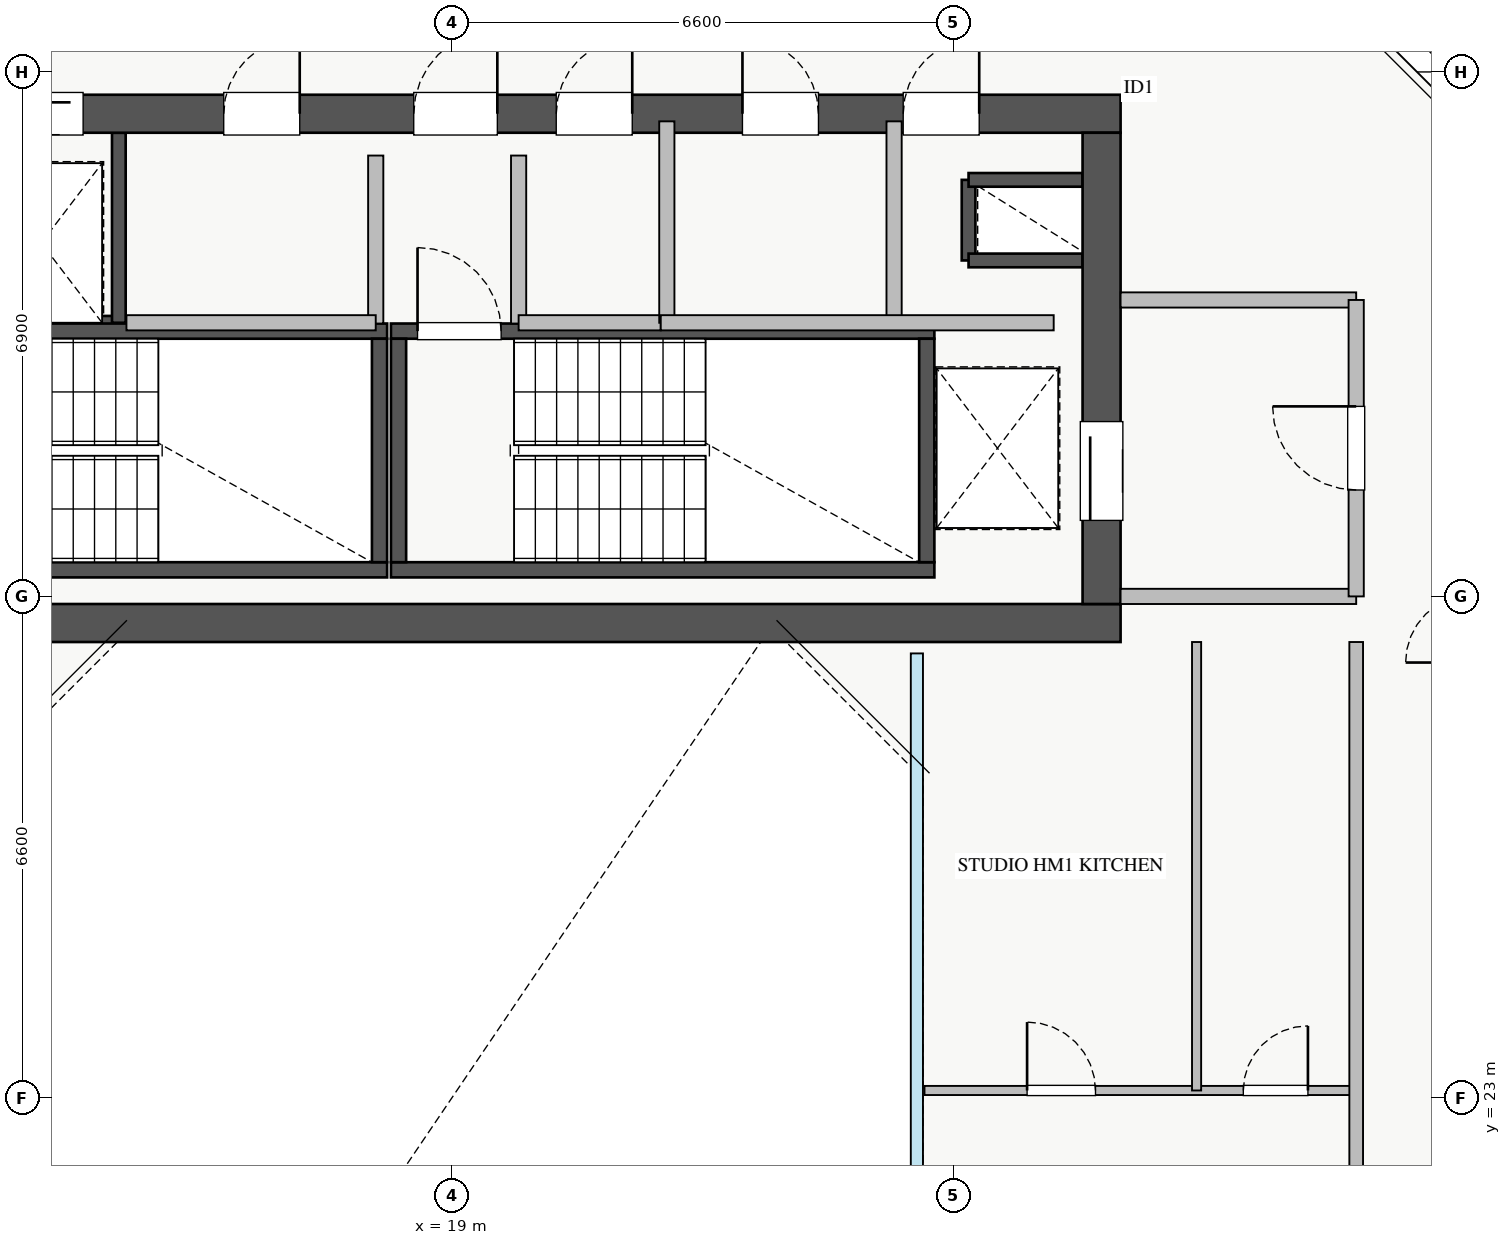
"""IFC4 building model, lengths in metres.
Left out: names, types, materials, properties, quantities, classifications, styles, units other than length and angle.
Written with IfcOpenShell. Run it as: python <this file> out.ifc"""

import sys

from ifc_helpers import new_model, si_unit, direction, frame, frame_2d, origin, place, context, subcontext, project, spatial, rectangle, extrude, source, transform, mapped, element, fill, save


model = new_model("IFC4")
c1 = context("Model", 3, precision=1e-05, world=origin(), true_north=direction((0.0, 1.0)))
c2 = subcontext(c1, "Body", "Model", "MODEL_VIEW")
j1 = project(units=[si_unit("LENGTHUNIT", "METRE"), si_unit("PLANEANGLEUNIT", "RADIAN")], contexts=[c1])
p1 = place(None, origin())
s1 = spatial("IfcSite", under=j1, at=p1, CompositionType="ELEMENT")
p2 = place(p1, origin())
s2 = spatial("IfcBuilding", under=s1, at=p2, CompositionType="ELEMENT")
p3 = place(p2, frame((0.0, 0.0, 197.0)))
s3 = spatial("IfcBuildingStorey", under=s2, at=p3, CompositionType="ELEMENT", Elevation=197.0)
p4 = place(p3, frame((12.68, 33.2, 0.0), z_axis=(0.0, 0.0, 1.0), x_axis=(1.0, 0.0, 0.0)))
e1 = element("IfcWall", 1, at=p4, inside=s3, PredefinedType="SHEAR", context=c2, shape_type="SweptSolid", body=[
    extrude(rectangle(XDim=1.94, YDim=0.18, at=frame_2d((0.97, 0.0))), origin(), (0.0, 0.0, 1.0), 3.07),
])
p5 = place(p3, frame((14.62, 33.2, 0.0), z_axis=(0.0, 0.0, 1.0), x_axis=(0.0, 1.0, 0.0)))
e2 = element("IfcWall", 2, at=p5, inside=s3, PredefinedType="SHEAR", context=c2, shape_type="SweptSolid", body=[
    extrude(rectangle(XDim=2.5, YDim=0.18, at=frame_2d((1.25, 0.0))), origin(), (0.0, 0.0, 1.0), 3.07),
])
p6 = place(p3, frame((25.8, 34.02, 0.0), z_axis=(0.0, 0.0, 1.0), x_axis=(0.0, 1.0, 0.0)))
e3 = element("IfcWall", 3, at=p6, inside=s3, PredefinedType="SHEAR", context=c2, shape_type="SweptSolid", body=[
    extrude(rectangle(XDim=1.06, YDim=0.18, at=frame_2d((0.53, 0.0))), origin(), (0.0, 0.0, 1.0), 3.07),
])
for number, where, z_axis, x_axis in (
    (4, (25.8, 35.08, 0.0), (0.0, 0.0, 1.0), (1.0, 0.0, 0.0)),
    (5, (25.8, 34.02, 0.0), (0.0, 0.0, 1.0), (1.0, 0.0, 0.0)),
):
    element("IfcWall", number, at=place(p3, frame(where, z_axis=z_axis, x_axis=x_axis)), inside=s3, PredefinedType="SHEAR", context=c2, shape_type="SweptSolid", body=[
        extrude(rectangle(XDim=1.5, YDim=0.18, at=frame_2d((0.75, 0.0))), origin(), (0.0, 0.0, 1.0), 3.07),
    ])
p7 = place(p3, frame((10.7, 29.95, 0.0), z_axis=(0.0, 0.0, 1.0), x_axis=(1.0, 0.0, 0.0)))
e6 = element("IfcWall", 6, at=p7, inside=s3, PredefinedType="SHEAR", context=c2, shape_type="SweptSolid", body=[
    extrude(rectangle(XDim=7.45, YDim=0.2, at=frame_2d((3.725, 0.0))), origin(), (0.0, 0.0, 1.0), 3.25),
])
p8 = place(p3, frame((10.7, 33.09, 0.0), z_axis=(0.0, 0.0, 1.0), x_axis=(1.0, 0.0, 0.0)))
e7 = element("IfcWall", 7, at=p8, inside=s3, PredefinedType="SHEAR", context=c2, shape_type="SweptSolid", body=[
    extrude(rectangle(XDim=7.45, YDim=0.2, at=frame_2d((3.725, 0.0))), origin(), (0.0, 0.0, 1.0), 3.25),
])
p9 = place(p8, frame((0.35, 0.0, 0.0)))
e8 = element("IfcOpeningElement", 8, at=p9, cuts=e7, PredefinedType="OPENING", context=c2, shape_type="SweptSolid", body=[
    extrude(rectangle(XDim=1.1, YDim=2.05, at=frame_2d((0.55, 1.025))), frame((0.0, 0.11, 0.0), z_axis=(0.0, -1.0, 0.0), x_axis=(1.0, 0.0, 0.0)), (0.0, 0.0, 1.0), 0.22),
])
p10 = place(p3, frame((18.05, 30.05, 0.0), z_axis=(0.0, 0.0, 1.0), x_axis=(0.0, 1.0, 0.0)))
e9 = element("IfcWall", 9, at=p10, inside=s3, PredefinedType="SHEAR", context=c2, shape_type="SweptSolid", body=[
    extrude(rectangle(XDim=2.94, YDim=0.2, at=frame_2d((1.47, 0.0))), origin(), (0.0, 0.0, 1.0), 3.25),
])
p11 = place(p3, frame((18.2, 29.95, 0.0), z_axis=(0.0, 0.0, 1.0), x_axis=(1.0, 0.0, 0.0)))
e10 = element("IfcWall", 10, at=p11, inside=s3, PredefinedType="SHEAR", context=c2, shape_type="SweptSolid", body=[
    extrude(rectangle(XDim=7.15, YDim=0.2, at=frame_2d((3.575, 0.0))), origin(), (0.0, 0.0, 1.0), 3.25),
])
p12 = place(p3, frame((18.2, 33.09, 0.0), z_axis=(0.0, 0.0, 1.0), x_axis=(1.0, 0.0, 0.0)))
e11 = element("IfcWall", 11, at=p12, inside=s3, PredefinedType="SHEAR", context=c2, shape_type="SweptSolid", body=[
    extrude(rectangle(XDim=7.15, YDim=0.2, at=frame_2d((3.575, 0.0))), origin(), (0.0, 0.0, 1.0), 3.25),
])
p13 = place(p12, frame((0.35, 0.0, 0.0)))
e12 = element("IfcOpeningElement", 12, at=p13, cuts=e11, PredefinedType="OPENING", context=c2, shape_type="SweptSolid", body=[
    extrude(rectangle(XDim=1.1, YDim=2.05, at=frame_2d((0.55, 1.025))), frame((0.0, 0.11, 0.0), z_axis=(0.0, -1.0, 0.0), x_axis=(1.0, 0.0, 0.0)), (0.0, 0.0, 1.0), 0.22),
])
for number, where, z_axis, x_axis in (
    (13, (18.3, 30.05, 0.0), (0.0, 0.0, 1.0), (0.0, 1.0, 0.0)),
    (14, (25.25, 30.05, 0.0), (0.0, 0.0, 1.0), (0.0, 1.0, 0.0)),
):
    element("IfcWall", number, at=place(p3, frame(where, z_axis=z_axis, x_axis=x_axis)), inside=s3, PredefinedType="SHEAR", context=c2, shape_type="SweptSolid", body=[
        extrude(rectangle(XDim=2.94, YDim=0.2, at=frame_2d((1.47, 0.0))), origin(), (0.0, 0.0, 1.0), 3.25),
    ])
p14 = place(p3, frame((10.2, 29.25, 0.0), z_axis=(0.0, 0.0, 1.0), x_axis=(1.0, 0.0, 0.0)))
e15 = element("IfcWall", 15, at=p14, inside=s3, PredefinedType="SHEAR", context=c2, shape_type="SweptSolid", body=[
    extrude(rectangle(XDim=17.6, YDim=0.5, at=frame_2d((8.8, 0.0))), origin(), (0.0, 0.0, 1.0), 3.25),
])
p15 = place(p3, frame((10.2, 35.95, 0.0), z_axis=(0.0, 0.0, 1.0), x_axis=(1.0, 0.0, 0.0)))
e16 = element("IfcWall", 16, at=p15, inside=s3, PredefinedType="SHEAR", context=c2, shape_type="SweptSolid", body=[
    extrude(rectangle(XDim=17.6, YDim=0.5, at=frame_2d((8.8, 0.0))), origin(), (0.0, 0.0, 1.0), 3.25),
])
p16 = place(p15, frame((1.15, 0.0, 0.0)))
e17 = element("IfcOpeningElement", 17, at=p16, cuts=e16, PredefinedType="OPENING", context=c2, shape_type="SweptSolid", body=[
    extrude(rectangle(XDim=1.1, YDim=2.05, at=frame_2d((0.55, 1.025))), frame((0.0, 0.26, 0.0), z_axis=(0.0, -1.0, 0.0), x_axis=(1.0, 0.0, 0.0)), (0.0, 0.0, 1.0), 0.52),
])
p17 = place(p15, frame((8.3, 0.0, 0.0)))
e18 = element("IfcOpeningElement", 18, at=p17, cuts=e16, PredefinedType="OPENING", context=c2, shape_type="SweptSolid", body=[
    extrude(rectangle(XDim=1.1, YDim=2.05, at=frame_2d((0.55, 1.025))), frame((0.0, 0.26, 0.0), z_axis=(0.0, -1.0, 0.0), x_axis=(1.0, 0.0, 0.0)), (0.0, 0.0, 1.0), 0.52),
])
p18 = place(p15, frame((2.85, 0.0, 0.0)))
e19 = element("IfcOpeningElement", 19, at=p18, cuts=e16, PredefinedType="OPENING", context=c2, shape_type="SweptSolid", body=[
    extrude(rectangle(XDim=1.1, YDim=2.05, at=frame_2d((0.55, 1.025))), frame((0.0, 0.26, 0.0), z_axis=(0.0, -1.0, 0.0), x_axis=(1.0, 0.0, 0.0)), (0.0, 0.0, 1.0), 0.52),
])
p19 = place(p15, frame((5.8, 0.0, 0.0)))
e20 = element("IfcOpeningElement", 20, at=p19, cuts=e16, PredefinedType="OPENING", context=c2, shape_type="SweptSolid", body=[
    extrude(rectangle(XDim=1.0, YDim=2.05, at=frame_2d((0.5, 1.025))), frame((0.0, 0.26, 0.0), z_axis=(0.0, -1.0, 0.0), x_axis=(1.0, 0.0, 0.0)), (0.0, 0.0, 1.0), 0.52),
])
p20 = place(p15, frame((14.74, 0.0, 0.0)))
e21 = element("IfcOpeningElement", 21, at=p20, cuts=e16, PredefinedType="OPENING", context=c2, shape_type="SweptSolid", body=[
    extrude(rectangle(XDim=1.0, YDim=2.05, at=frame_2d((0.5, 1.025))), frame((0.0, 0.26, 0.0), z_axis=(0.0, -1.0, 0.0), x_axis=(1.0, 0.0, 0.0)), (0.0, 0.0, 1.0), 0.52),
])
p21 = place(p15, frame((10.175, 0.0, 0.0)))
e22 = element("IfcOpeningElement", 22, at=p21, cuts=e16, PredefinedType="OPENING", context=c2, shape_type="SweptSolid", body=[
    extrude(rectangle(XDim=1.0, YDim=2.05, at=frame_2d((0.5, 1.025))), frame((0.0, 0.26, 0.0), z_axis=(0.0, -1.0, 0.0), x_axis=(1.0, 0.0, 0.0)), (0.0, 0.0, 1.0), 0.52),
])
p22 = place(p15, frame((12.625, 0.0, 0.0)))
e23 = element("IfcOpeningElement", 23, at=p22, cuts=e16, PredefinedType="OPENING", context=c2, shape_type="SweptSolid", body=[
    extrude(rectangle(XDim=1.0, YDim=2.05, at=frame_2d((0.5, 1.025))), frame((0.0, 0.26, 0.0), z_axis=(0.0, -1.0, 0.0), x_axis=(1.0, 0.0, 0.0)), (0.0, 0.0, 1.0), 0.52),
])
p23 = place(p3, frame((27.55, 29.5, 0.0), z_axis=(0.0, 0.0, 1.0), x_axis=(0.0, 1.0, 0.0)))
e24 = element("IfcWall", 24, at=p23, inside=s3, PredefinedType="SHEAR", context=c2, shape_type="SweptSolid", body=[
    extrude(rectangle(XDim=6.2, YDim=0.5, at=frame_2d((3.1, 0.0))), origin(), (0.0, 0.0, 1.0), 3.25),
])
p24 = place(p23, frame((1.1, 0.0, 0.0)))
e25 = element("IfcOpeningElement", 25, at=p24, cuts=e24, PredefinedType="OPENING", context=c2, shape_type="SweptSolid", body=[
    extrude(rectangle(XDim=1.3, YDim=2.05, at=frame_2d((0.65, 1.025))), frame((0.0, 0.26, 0.0), z_axis=(0.0, -1.0, 0.0), x_axis=(1.0, 0.0, 0.0)), (0.0, 0.0, 1.0), 0.52),
])
p25 = place(p3, frame((27.8, 29.6, 0.0), z_axis=(0.0, 0.0, 1.0), x_axis=(1.0, 0.0, 0.0)))
e26 = element("IfcWall", 26, at=p25, inside=s3, PredefinedType="PARTITIONING", context=c2, shape_type="SweptSolid", body=[
    extrude(rectangle(XDim=3.1, YDim=0.2, at=frame_2d((1.55, 0.0))), origin(), (0.0, 0.0, 1.0), 3.07),
])
p26 = place(p3, frame((27.8, 33.5, 0.0), z_axis=(0.0, 0.0, 1.0), x_axis=(1.0, 0.0, 0.0)))
e27 = element("IfcWall", 27, at=p26, inside=s3, PredefinedType="PARTITIONING", context=c2, shape_type="SweptSolid", body=[
    extrude(rectangle(XDim=3.1, YDim=0.2, at=frame_2d((1.55, 0.0))), origin(), (0.0, 0.0, 1.0), 2.265),
])
p27 = place(p3, frame((30.9, 29.6, 0.0), z_axis=(0.0, 0.0, 1.0), x_axis=(0.0, 1.0, 0.0)))
e28 = element("IfcWall", 28, at=p27, inside=s3, PredefinedType="PARTITIONING", context=c2, shape_type="SweptSolid", body=[
    extrude(rectangle(XDim=3.9, YDim=0.2, at=frame_2d((1.95, 0.0))), origin(), (0.0, 0.0, 1.0), 3.07),
])
p28 = place(p27, frame((1.4, 0.0, 0.0)))
e29 = element("IfcOpeningElement", 29, at=p28, cuts=e28, PredefinedType="OPENING", context=c2, shape_type="SweptSolid", body=[
    extrude(rectangle(XDim=1.1, YDim=2.05, at=frame_2d((0.55, 1.025))), frame((0.0, 0.11, 0.0), z_axis=(0.0, -1.0, 0.0), x_axis=(1.0, 0.0, 0.0)), (0.0, 0.0, 1.0), 0.22),
])
for number, where, z_axis, x_axis in (
    (30, (18.0, 33.19, 0.0), (0.0, 0.0, 1.0), (0.0, 1.0, 0.0)),
    (31, (19.88, 33.19, 0.0), (0.0, 0.0, 1.0), (0.0, 1.0, 0.0)),
):
    element("IfcWall", number, at=place(p3, frame(where, z_axis=z_axis, x_axis=x_axis)), inside=s3, PredefinedType="PARTITIONING", context=c2, shape_type="SweptSolid", body=[
        extrude(rectangle(XDim=2.21, YDim=0.2, at=frame_2d((1.105, 0.0))), origin(), (0.0, 0.0, 1.0), 3.07),
    ])
p29 = place(p3, frame((14.72, 33.2, 0.0), z_axis=(0.0, 0.0, 1.0), x_axis=(1.0, 0.0, 0.0)))
e32 = element("IfcWall", 32, at=p29, inside=s3, PredefinedType="PARTITIONING", context=c2, shape_type="SweptSolid", body=[
    extrude(rectangle(XDim=3.28, YDim=0.2, at=frame_2d((1.64, 0.0))), origin(), (0.0, 0.0, 1.0), 3.07),
])
p30 = place(p3, frame((24.82, 33.2, 0.0), z_axis=(0.0, 0.0, 1.0), x_axis=(0.0, 1.0, 0.0)))
e33 = element("IfcWall", 33, at=p30, inside=s3, PredefinedType="PARTITIONING", context=c2, shape_type="SweptSolid", body=[
    extrude(rectangle(XDim=2.65, YDim=0.2, at=frame_2d((1.325, 0.0))), origin(), (0.0, 0.0, 1.0), 3.07),
])
p31 = place(p3, frame((19.88, 33.2, 0.0), z_axis=(0.0, 0.0, 1.0), x_axis=(1.0, 0.0, 0.0)))
e34 = element("IfcWall", 34, at=p31, inside=s3, PredefinedType="PARTITIONING", context=c2, shape_type="SweptSolid", body=[
    extrude(rectangle(XDim=1.87, YDim=0.2, at=frame_2d((0.935, 0.0))), origin(), (0.0, 0.0, 1.0), 3.07),
])
p32 = place(p3, frame((21.83, 33.2, 0.0), z_axis=(0.0, 0.0, 1.0), x_axis=(0.0, 1.0, 0.0)))
e35 = element("IfcWall", 35, at=p32, inside=s3, PredefinedType="PARTITIONING", context=c2, shape_type="SweptSolid", body=[
    extrude(rectangle(XDim=2.65, YDim=0.2, at=frame_2d((1.325, 0.0))), origin(), (0.0, 0.0, 1.0), 3.07),
])
p33 = place(p3, frame((21.75, 33.2, 0.0), z_axis=(0.0, 0.0, 1.0), x_axis=(1.0, 0.0, 0.0)))
e36 = element("IfcWall", 36, at=p33, inside=s3, PredefinedType="PARTITIONING", context=c2, shape_type="SweptSolid", body=[
    extrude(rectangle(XDim=5.17, YDim=0.2, at=frame_2d((2.585, 0.0))), origin(), (0.0, 0.0, 1.0), 3.07),
])
p34 = place(p3, frame((25.22, 23.1, 0.0), z_axis=(0.0, 0.0, 1.0), x_axis=(1.0, 0.0, 0.0)))
e37 = element("IfcWall", 37, at=p34, inside=s3, PredefinedType="PLUMBINGWALL", context=c2, shape_type="SweptSolid", body=[
    extrude(rectangle(XDim=5.68, YDim=0.12, at=frame_2d((2.84, 0.0))), origin(), (0.0, 0.0, 1.0), 3.07),
])
p35 = place(p34, frame((1.35, 0.0, 0.0)))
e38 = element("IfcOpeningElement", 38, at=p35, cuts=e37, PredefinedType="OPENING", context=c2, shape_type="SweptSolid", body=[
    extrude(rectangle(XDim=0.9, YDim=2.05, at=frame_2d((0.45, 1.025))), frame((0.0, 0.07, 0.0), z_axis=(0.0, -1.0, 0.0), x_axis=(1.0, 0.0, 0.0)), (0.0, 0.0, 1.0), 0.14),
])
p36 = place(p34, frame((4.195, 0.0, 0.0)))
e39 = element("IfcOpeningElement", 39, at=p36, cuts=e37, PredefinedType="OPENING", context=c2, shape_type="SweptSolid", body=[
    extrude(rectangle(XDim=0.85, YDim=2.05, at=frame_2d((0.425, 1.025))), frame((0.0, 0.07, 0.0), z_axis=(0.0, -1.0, 0.0), x_axis=(1.0, 0.0, 0.0)), (0.0, 0.0, 1.0), 0.14),
])
p37 = place(p3, frame((28.8, 23.1, 0.0), z_axis=(0.0, 0.0, 1.0), x_axis=(0.0, 1.0, 0.0)))
e40 = element("IfcWall", 40, at=p37, inside=s3, PredefinedType="PLUMBINGWALL", context=c2, shape_type="SweptSolid", body=[
    extrude(rectangle(XDim=5.9, YDim=0.12, at=frame_2d((2.95, 0.0))), origin(), (0.0, 0.0, 1.0), 3.07),
])
p38 = place(p3, frame((30.9, 17.0, 0.0), z_axis=(0.0, 0.0, 1.0), x_axis=(0.0, 1.0, 0.0)))
e41 = element("IfcWall", 41, at=p38, inside=s3, PredefinedType="PARTITIONING", context=c2, shape_type="SweptSolid", body=[
    extrude(rectangle(XDim=12.0, YDim=0.18, at=frame_2d((6.0, 0.0))), origin(), (0.0, 0.0, 1.0), 3.07),
])
p39 = place(p38, frame((2.36, 0.0, 0.0)))
e42 = element("IfcOpeningElement", 42, at=p39, cuts=e41, PredefinedType="OPENING", context=c2, shape_type="SweptSolid", body=[
    extrude(rectangle(XDim=1.0, YDim=2.05, at=frame_2d((0.5, 1.025))), frame((0.0, 0.1, 0.0), z_axis=(0.0, -1.0, 0.0), x_axis=(1.0, 0.0, 0.0)), (0.0, 0.0, 1.0), 0.2),
])
m1 = source(origin(), c2, "Body", "SweptSolid", [
    extrude(rectangle(XDim=1.3, YDim=2.05, at=frame_2d((0.65, 1.025))), frame((0.0, 0.025, 0.0), z_axis=(0.0, -1.0, 0.0), x_axis=(1.0, 0.0, 0.0)), (0.0, 0.0, 1.0), 0.05),
])
p40 = place(p24, origin())
e43 = element("IfcDoor", 43, at=p40, inside=s3, OperationType="SLIDING_TO_LEFT", PredefinedType="DOOR", context=c2, shape_type="MappedRepresentation", body=[
    mapped(m1, transform((0.0, 0.0, 0.0), x_axis=(1.0, 0.0, 0.0), y_axis=(0.0, 1.0, 0.0), z_axis=(0.0, 0.0, 1.0), scale=1.0)),
])
fill(e25, e43)
m2 = source(origin(), c2, "Body", "SweptSolid", [
    extrude(rectangle(XDim=1.1, YDim=2.05, at=frame_2d((0.55, 1.025))), frame((0.0, 0.025, 0.0), z_axis=(0.0, -1.0, 0.0), x_axis=(1.0, 0.0, 0.0)), (0.0, 0.0, 1.0), 0.05),
])
p41 = place(p17, origin())
e44 = element("IfcDoor", 44, at=p41, inside=s3, OperationType="SINGLE_SWING_RIGHT", PredefinedType="DOOR", context=c2, shape_type="MappedRepresentation", body=[
    mapped(m2, transform((0.0, 0.0, 0.0), x_axis=(1.0, 0.0, 0.0), y_axis=(0.0, 1.0, 0.0), z_axis=(0.0, 0.0, 1.0), scale=1.0)),
])
fill(e18, e44)
p42 = place(p13, origin())
e45 = element("IfcDoor", 45, at=p42, inside=s3, OperationType="SINGLE_SWING_LEFT", PredefinedType="DOOR", context=c2, shape_type="MappedRepresentation", body=[
    mapped(m2, transform((0.0, 0.0, 0.0), x_axis=(1.0, 0.0, 0.0), y_axis=(0.0, 1.0, 0.0), z_axis=(0.0, 0.0, 1.0), scale=1.0)),
])
fill(e12, e45)
p43 = place(p18, origin())
e46 = element("IfcDoor", 46, at=p43, inside=s3, OperationType="SLIDING_TO_LEFT", PredefinedType="DOOR", context=c2, shape_type="MappedRepresentation", body=[
    mapped(m2, transform((0.0, 0.0, 0.0), x_axis=(1.0, 0.0, 0.0), y_axis=(0.0, 1.0, 0.0), z_axis=(0.0, 0.0, 1.0), scale=1.0)),
])
fill(e19, e46)
m3 = source(origin(), c2, "Body", "SweptSolid", [
    extrude(rectangle(XDim=1.0, YDim=2.05, at=frame_2d((0.5, 1.025))), frame((0.0, 0.025, 0.0), z_axis=(0.0, -1.0, 0.0), x_axis=(1.0, 0.0, 0.0)), (0.0, 0.0, 1.0), 0.05),
])
p44 = place(p19, origin())
e47 = element("IfcDoor", 47, at=p44, inside=s3, OperationType="SINGLE_SWING_RIGHT", PredefinedType="DOOR", context=c2, shape_type="MappedRepresentation", body=[
    mapped(m3, transform((0.0, 0.0, 0.0), x_axis=(1.0, 0.0, 0.0), y_axis=(0.0, 1.0, 0.0), z_axis=(0.0, 0.0, 1.0), scale=1.0)),
])
fill(e20, e47)
p45 = place(p20, origin())
e48 = element("IfcDoor", 48, at=p45, inside=s3, OperationType="SINGLE_SWING_RIGHT", PredefinedType="DOOR", context=c2, shape_type="MappedRepresentation", body=[
    mapped(m3, transform((0.0, 0.0, 0.0), x_axis=(1.0, 0.0, 0.0), y_axis=(0.0, 1.0, 0.0), z_axis=(0.0, 0.0, 1.0), scale=1.0)),
])
fill(e21, e48)
p46 = place(p21, origin())
e49 = element("IfcDoor", 49, at=p46, inside=s3, OperationType="SINGLE_SWING_RIGHT", PredefinedType="DOOR", context=c2, shape_type="MappedRepresentation", body=[
    mapped(m3, transform((0.0, 0.0, 0.0), x_axis=(1.0, 0.0, 0.0), y_axis=(0.0, 1.0, 0.0), z_axis=(0.0, 0.0, 1.0), scale=1.0)),
])
fill(e22, e49)
p47 = place(p22, origin())
e50 = element("IfcDoor", 50, at=p47, inside=s3, OperationType="SINGLE_SWING_LEFT", PredefinedType="DOOR", context=c2, shape_type="MappedRepresentation", body=[
    mapped(m3, transform((0.0, 0.0, 0.0), x_axis=(1.0, 0.0, 0.0), y_axis=(0.0, 1.0, 0.0), z_axis=(0.0, 0.0, 1.0), scale=1.0)),
])
fill(e23, e50)
p48 = place(p28, origin())
e51 = element("IfcDoor", 51, at=p48, inside=s3, OperationType="SINGLE_SWING_RIGHT", PredefinedType="DOOR", context=c2, shape_type="MappedRepresentation", body=[
    mapped(m2, transform((0.0, 0.0, 0.0), x_axis=(1.0, 0.0, 0.0), y_axis=(0.0, 1.0, 0.0), z_axis=(0.0, 0.0, 1.0), scale=1.0)),
])
fill(e29, e51)
m4 = source(origin(), c2, "Body", "SweptSolid", [
    extrude(rectangle(XDim=0.9, YDim=2.05, at=frame_2d((0.45, 1.025))), frame((0.0, 0.025, 0.0), z_axis=(0.0, -1.0, 0.0), x_axis=(1.0, 0.0, 0.0)), (0.0, 0.0, 1.0), 0.05),
])
p49 = place(p35, origin())
e52 = element("IfcDoor", 52, at=p49, inside=s3, OperationType="SINGLE_SWING_LEFT", PredefinedType="DOOR", context=c2, shape_type="MappedRepresentation", body=[
    mapped(m4, transform((0.0, 0.0, 0.0), x_axis=(1.0, 0.0, 0.0), y_axis=(0.0, 1.0, 0.0), z_axis=(0.0, 0.0, 1.0), scale=1.0)),
])
fill(e38, e52)
m5 = source(origin(), c2, "Body", "SweptSolid", [
    extrude(rectangle(XDim=0.85, YDim=2.05, at=frame_2d((0.425, 1.025))), frame((0.0, 0.025, 0.0), z_axis=(0.0, -1.0, 0.0), x_axis=(1.0, 0.0, 0.0)), (0.0, 0.0, 1.0), 0.05),
])
p50 = place(p36, origin())
e53 = element("IfcDoor", 53, at=p50, inside=s3, OperationType="SINGLE_SWING_RIGHT", PredefinedType="DOOR", context=c2, shape_type="MappedRepresentation", body=[
    mapped(m5, transform((0.0, 0.0, 0.0), x_axis=(1.0, 0.0, 0.0), y_axis=(0.0, 1.0, 0.0), z_axis=(0.0, 0.0, 1.0), scale=1.0)),
])
fill(e39, e53)
save(model, sys.argv[1])
